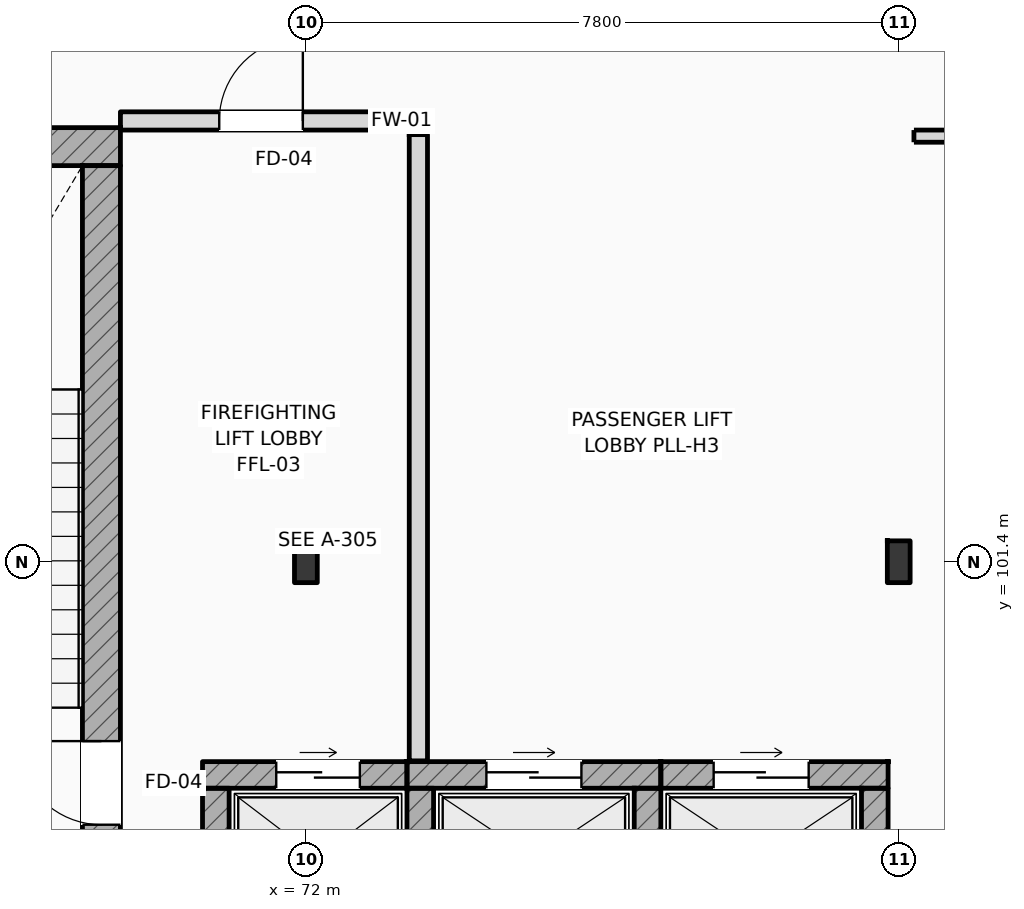
"""IFC4 building model, lengths in metres.
Left out: names, types, materials, properties, quantities, classifications, styles, units other than length and angle.
Written with IfcOpenShell. Run it as: python <this file> out.ifc"""

import sys

from ifc_helpers import new_model, si_unit, direction, frame, frame_2d, origin, origin_2d, place, context, subcontext, project, spatial, rectangle, i_section, extrude, element, fill, save


model = new_model("IFC4")
c1 = context("Model", 3, precision=1e-05, world=origin(), true_north=direction((0.0, 1.0)))
c2 = subcontext(c1, "Body", "Model", "MODEL_VIEW")
j1 = project(units=[si_unit("LENGTHUNIT", "METRE"), si_unit("PLANEANGLEUNIT", "RADIAN")], contexts=[c1])
p1 = place(None, origin())
s1 = spatial("IfcSite", under=j1, at=p1, CompositionType="ELEMENT")
p2 = place(p1, origin())
s2 = spatial("IfcBuilding", under=s1, at=p2, CompositionType="ELEMENT")
p3 = place(p2, frame((0.0, 0.0, 11.4)))
s3 = spatial("IfcBuildingStorey", under=s2, at=p3, CompositionType="ELEMENT", Elevation=11.4)
for number, where, z_axis, x_axis in (
    (1, (72.0, 101.4, 0.0), (0.0, 0.0, 1.0), (1.0, 0.0, 0.0)),
    (2, (79.8, 101.4, 0.0), (0.0, 0.0, 1.0), (1.0, 0.0, 0.0)),
):
    element("IfcColumn", number, at=place(p3, frame(where, z_axis=z_axis, x_axis=x_axis)), inside=s3, PredefinedType="COLUMN", context=c2, shape_type="SweptSolid", body=[
        extrude(i_section(OverallWidth=0.3, OverallDepth=0.55, WebThickness=0.015, FlangeThickness=0.029, FilletRadius=0.027, at=origin_2d()), origin(), (0.0, 0.0, 1.0), 4.8),
    ])
p4 = place(p3, frame((64.4, 106.862, 0.0), z_axis=(0.0, 0.0, 1.0), x_axis=(1.0, 0.0, 0.0)))
e3 = element("IfcWall", 3, at=p4, inside=s3, PredefinedType="SHEAR", context=c2, shape_type="SweptSolid", body=[
    extrude(rectangle(XDim=5.16, YDim=0.5, at=frame_2d((2.58, 0.0))), origin(), (0.0, 0.0, 1.0), 4.8),
])
p5 = place(p3, frame((69.31, 97.5, 0.0), z_axis=(0.0, 0.0, 1.0), x_axis=(0.0, 1.0, 0.0)))
e4 = element("IfcWall", 4, at=p5, inside=s3, PredefinedType="SHEAR", context=c2, shape_type="SweptSolid", body=[
    extrude(rectangle(XDim=9.112, YDim=0.5, at=frame_2d((4.556, 0.0))), origin(), (0.0, 0.0, 1.0), 4.8),
])
p6 = place(p5, frame((0.44, 0.0, 0.0)))
e5 = element("IfcOpeningElement", 5, at=p6, cuts=e4, PredefinedType="OPENING", context=c2, shape_type="SweptSolid", body=[
    extrude(rectangle(XDim=1.1, YDim=2.2, at=frame_2d((0.55, 1.1))), frame((0.0, 0.26, 0.0), z_axis=(0.0, -1.0, 0.0), x_axis=(1.0, 0.0, 0.0)), (0.0, 0.0, 1.0), 0.52),
])
p7 = place(p3, frame((70.64, 98.595, 0.0), z_axis=(0.0, 0.0, 1.0), x_axis=(1.0, 0.0, 0.0)))
e6 = element("IfcWall", 6, at=p7, inside=s3, PredefinedType="SHEAR", context=c2, shape_type="SweptSolid", body=[
    extrude(rectangle(XDim=2.69, YDim=0.35, at=frame_2d((1.345, 0.0))), origin(), (0.0, 0.0, 1.0), 4.52),
])
p8 = place(p7, frame((0.97, 0.0, 0.0)))
e7 = element("IfcOpeningElement", 7, at=p8, cuts=e6, PredefinedType="OPENING", context=c2, shape_type="SweptSolid", body=[
    extrude(rectangle(XDim=1.1, YDim=2.2, at=frame_2d((0.55, 1.1))), frame((0.0, 0.185, 0.0), z_axis=(0.0, -1.0, 0.0), x_axis=(1.0, 0.0, 0.0)), (0.0, 0.0, 1.0), 0.37),
])
p9 = place(p3, frame((70.815, 96.58, 0.0), z_axis=(0.0, 0.0, 1.0), x_axis=(0.0, 1.0, 0.0)))
e8 = element("IfcWall", 8, at=p9, inside=s3, PredefinedType="SHEAR", context=c2, shape_type="SweptSolid", body=[
    extrude(rectangle(XDim=1.84, YDim=0.35, at=frame_2d((0.92, 0.0))), origin(), (0.0, 0.0, 1.0), 4.52),
])
p10 = place(p3, frame((73.33, 98.595, 0.0), z_axis=(0.0, 0.0, 1.0), x_axis=(1.0, 0.0, 0.0)))
e9 = element("IfcWall", 9, at=p10, inside=s3, PredefinedType="SHEAR", context=c2, shape_type="SweptSolid", body=[
    extrude(rectangle(XDim=3.34, YDim=0.35, at=frame_2d((1.67, 0.0))), origin(), (0.0, 0.0, 1.0), 4.52),
])
p11 = place(p10, frame((1.045, 0.0, 0.0)))
e10 = element("IfcOpeningElement", 10, at=p11, cuts=e9, PredefinedType="OPENING", context=c2, shape_type="SweptSolid", body=[
    extrude(rectangle(XDim=1.25, YDim=2.25, at=frame_2d((0.625, 1.125))), frame((0.0, 0.185, 0.0), z_axis=(0.0, -1.0, 0.0), x_axis=(1.0, 0.0, 0.0)), (0.0, 0.0, 1.0), 0.37),
])
for number, where, z_axis, x_axis in (
    (11, (73.505, 96.58, 0.0), (0.0, 0.0, 1.0), (0.0, 1.0, 0.0)),
    (12, (76.495, 96.58, 0.0), (0.0, 0.0, 1.0), (0.0, 1.0, 0.0)),
):
    element("IfcWall", number, at=place(p3, frame(where, z_axis=z_axis, x_axis=x_axis)), inside=s3, PredefinedType="SHEAR", context=c2, shape_type="SweptSolid", body=[
        extrude(rectangle(XDim=1.84, YDim=0.35, at=frame_2d((0.92, 0.0))), origin(), (0.0, 0.0, 1.0), 4.52),
    ])
p12 = place(p3, frame((76.67, 98.595, 0.0), z_axis=(0.0, 0.0, 1.0), x_axis=(1.0, 0.0, 0.0)))
e13 = element("IfcWall", 13, at=p12, inside=s3, PredefinedType="SHEAR", context=c2, shape_type="SweptSolid", body=[
    extrude(rectangle(XDim=2.99, YDim=0.35, at=frame_2d((1.495, 0.0))), origin(), (0.0, 0.0, 1.0), 4.52),
])
p13 = place(p12, frame((0.695, 0.0, 0.0)))
e14 = element("IfcOpeningElement", 14, at=p13, cuts=e13, PredefinedType="OPENING", context=c2, shape_type="SweptSolid", body=[
    extrude(rectangle(XDim=1.25, YDim=2.25, at=frame_2d((0.625, 1.125))), frame((0.0, 0.185, 0.0), z_axis=(0.0, -1.0, 0.0), x_axis=(1.0, 0.0, 0.0)), (0.0, 0.0, 1.0), 0.37),
])
p14 = place(p3, frame((79.485, 96.58, 0.0), z_axis=(0.0, 0.0, 1.0), x_axis=(0.0, 1.0, 0.0)))
e15 = element("IfcWall", 15, at=p14, inside=s3, PredefinedType="SHEAR", context=c2, shape_type="SweptSolid", body=[
    extrude(rectangle(XDim=1.84, YDim=0.35, at=frame_2d((0.92, 0.0))), origin(), (0.0, 0.0, 1.0), 4.11),
])
p15 = place(p3, frame((73.48, 98.78, 0.0), z_axis=(0.0, 0.0, 1.0), x_axis=(0.0, 1.0, 0.0)))
e16 = element("IfcWall", 16, at=p15, inside=s3, PredefinedType="STANDARD", context=c2, shape_type="SweptSolid", body=[
    extrude(rectangle(XDim=8.24, YDim=0.24, at=frame_2d((4.12, 0.0))), origin(), (0.0, 0.0, 1.0), 4.52),
])
p16 = place(p3, frame((69.56, 107.2, 0.0), z_axis=(0.0, 0.0, 1.0), x_axis=(1.0, 0.0, 0.0)))
e17 = element("IfcWall", 17, at=p16, inside=s3, PredefinedType="STANDARD", context=c2, shape_type="SweptSolid", body=[
    extrude(rectangle(XDim=4.1, YDim=0.24, at=frame_2d((2.05, 0.0))), origin(), (0.0, 0.0, 1.0), 4.52),
])
p17 = place(p16, frame((1.3, 0.0, 0.0)))
e18 = element("IfcOpeningElement", 18, at=p17, cuts=e17, PredefinedType="OPENING", context=c2, shape_type="SweptSolid", body=[
    extrude(rectangle(XDim=1.1, YDim=2.2, at=frame_2d((0.55, 1.1))), frame((0.0, 0.13, 0.0), z_axis=(0.0, -1.0, 0.0), x_axis=(1.0, 0.0, 0.0)), (0.0, 0.0, 1.0), 0.26),
])
p18 = place(p3, frame((80.0, 107.0, 0.0), z_axis=(0.0, 0.0, 1.0), x_axis=(1.0, 0.0, 0.0)))
e19 = element("IfcWall", 19, at=p18, inside=s3, PredefinedType="PARTITIONING", context=c2, shape_type="SweptSolid", body=[
    extrude(rectangle(XDim=39.35, YDim=0.16, at=frame_2d((19.675, 0.0))), origin(), (0.0, 0.0, 1.0), 4.52),
])
p19 = place(p18, frame((19.025, 0.0, 0.0)))
e20 = element("IfcOpeningElement", 20, at=p19, cuts=e19, PredefinedType="OPENING", context=c2, shape_type="SweptSolid", body=[
    extrude(rectangle(XDim=1.3, YDim=2.2, at=frame_2d((0.65, 1.1))), frame((0.0, 0.09, 0.0), z_axis=(0.0, -1.0, 0.0), x_axis=(1.0, 0.0, 0.0)), (0.0, 0.0, 1.0), 0.18),
])
p20 = place(p6, origin())
e21 = element("IfcDoor", 21, at=p20, inside=s3, OperationType="SINGLE_SWING_RIGHT", PredefinedType="DOOR", context=c2, shape_type="SweptSolid", body=[
    extrude(rectangle(XDim=1.1, YDim=2.2, at=frame_2d((0.55, 1.1))), frame((0.0, 0.025, 0.0), z_axis=(0.0, -1.0, 0.0), x_axis=(1.0, 0.0, 0.0)), (0.0, 0.0, 1.0), 0.05),
])
fill(e5, e21)
p21 = place(p8, origin())
e22 = element("IfcDoor", 22, at=p21, inside=s3, OperationType="SLIDING_TO_LEFT", PredefinedType="DOOR", context=c2, shape_type="SweptSolid", body=[
    extrude(rectangle(XDim=1.1, YDim=2.2, at=frame_2d((0.55, 1.1))), frame((0.0, 0.025, 0.0), z_axis=(0.0, -1.0, 0.0), x_axis=(1.0, 0.0, 0.0)), (0.0, 0.0, 1.0), 0.05),
])
fill(e7, e22)
p22 = place(p11, origin())
e23 = element("IfcDoor", 23, at=p22, inside=s3, OperationType="SLIDING_TO_LEFT", PredefinedType="DOOR", context=c2, shape_type="SweptSolid", body=[
    extrude(rectangle(XDim=1.25, YDim=2.25, at=frame_2d((0.625, 1.125))), frame((0.0, 0.025, 0.0), z_axis=(0.0, -1.0, 0.0), x_axis=(1.0, 0.0, 0.0)), (0.0, 0.0, 1.0), 0.05),
])
fill(e10, e23)
p23 = place(p13, origin())
e24 = element("IfcDoor", 24, at=p23, inside=s3, OperationType="SLIDING_TO_LEFT", PredefinedType="DOOR", context=c2, shape_type="SweptSolid", body=[
    extrude(rectangle(XDim=1.25, YDim=2.25, at=frame_2d((0.625, 1.125))), frame((0.0, 0.025, 0.0), z_axis=(0.0, -1.0, 0.0), x_axis=(1.0, 0.0, 0.0)), (0.0, 0.0, 1.0), 0.05),
])
fill(e14, e24)
p24 = place(p17, origin())
e25 = element("IfcDoor", 25, at=p24, inside=s3, OperationType="SINGLE_SWING_RIGHT", PredefinedType="DOOR", context=c2, shape_type="SweptSolid", body=[
    extrude(rectangle(XDim=1.1, YDim=2.2, at=frame_2d((0.55, 1.1))), frame((0.0, 0.025, 0.0), z_axis=(0.0, -1.0, 0.0), x_axis=(1.0, 0.0, 0.0)), (0.0, 0.0, 1.0), 0.05),
])
fill(e18, e25)
save(model, sys.argv[1])
